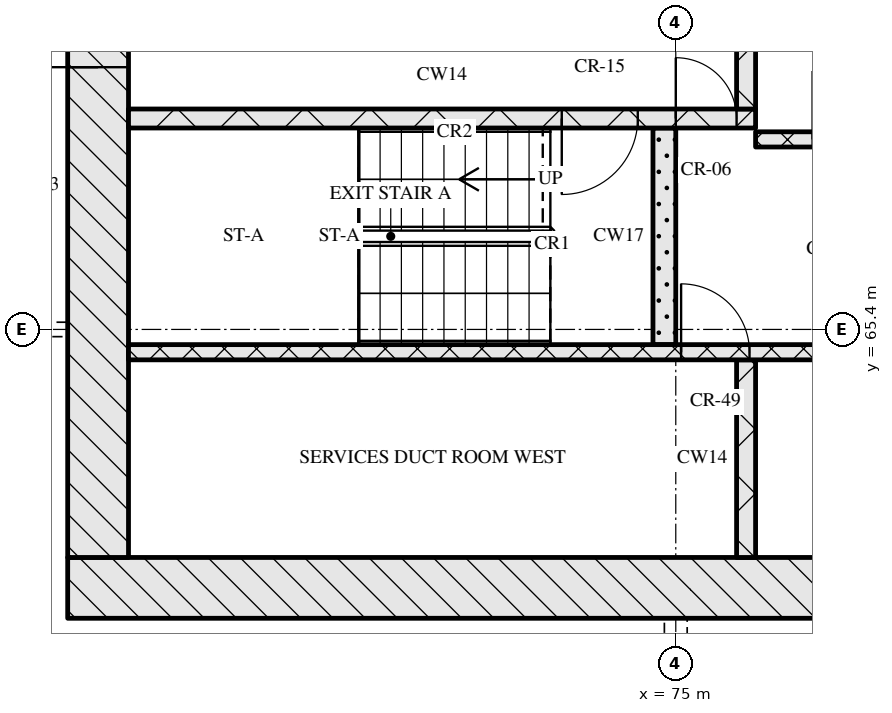
"""IFC4 building model, lengths in metres.
Left out: names, types, materials, properties, quantities, classifications, styles, units other than length and angle.
Written with IfcOpenShell. Run it as: python <this file> out.ifc"""

import sys

from ifc_helpers import new_model, si_unit, direction, frame, frame_2d, origin, place, context, subcontext, project, spatial, rectangle, extrude, element, fill, save


model = new_model("IFC4")
c1 = context("Model", 3, precision=1e-05, world=origin(), true_north=direction((0.0, 1.0)))
c2 = subcontext(c1, "Body", "Model", "MODEL_VIEW")
j1 = project(units=[si_unit("LENGTHUNIT", "METRE"), si_unit("PLANEANGLEUNIT", "RADIAN")], contexts=[c1])
p1 = place(None, origin())
s1 = spatial("IfcSite", under=j1, at=p1, CompositionType="ELEMENT")
p2 = place(p1, origin())
s2 = spatial("IfcBuilding", under=s1, at=p2, CompositionType="ELEMENT")
p3 = place(p2, frame((0.0, 0.0, 183.45)))
s3 = spatial("IfcBuildingStorey", under=s2, at=p3, CompositionType="ELEMENT", Elevation=183.45)
p4 = place(p3, frame((67.0, 62.0, 0.0), z_axis=(0.0, 0.0, 1.0), x_axis=(1.0, 0.0, 0.0)))
e1 = element("IfcWall", 1, at=p4, inside=s3, PredefinedType="SOLIDWALL", context=c2, shape_type="SweptSolid", body=[
    extrude(rectangle(XDim=41.2, YDim=0.8, at=frame_2d((20.6, 0.0))), origin(), (0.0, 0.0, 1.0), 3.32),
])
p5 = place(p4, frame((20.95, 0.0, 0.0)))
e2 = element("IfcOpeningElement", 2, at=p5, cuts=e1, PredefinedType="OPENING", context=c2, shape_type="SweptSolid", body=[
    extrude(rectangle(XDim=1.8, YDim=2.1, at=frame_2d((0.9, 1.05))), frame((0.0, 0.41, 0.0), z_axis=(0.0, -1.0, 0.0), x_axis=(1.0, 0.0, 0.0)), (0.0, 0.0, 1.0), 0.82),
])
p6 = place(p3, frame((67.4, 62.4, 0.0), z_axis=(0.0, 0.0, 1.0), x_axis=(0.0, 1.0, 0.0)))
e3 = element("IfcWall", 3, at=p6, inside=s3, PredefinedType="SOLIDWALL", context=c2, shape_type="SweptSolid", body=[
    extrude(rectangle(XDim=12.0, YDim=0.8, at=frame_2d((6.0, 0.0))), origin(), (0.0, 0.0, 1.0), 3.32),
])
p7 = place(p6, frame((6.45, 0.0, 0.0)))
e4 = element("IfcOpeningElement", 4, at=p7, cuts=e3, PredefinedType="OPENING", context=c2, shape_type="SweptSolid", body=[
    extrude(rectangle(XDim=1.2, YDim=2.1, at=frame_2d((0.6, 1.05))), frame((0.0, 0.41, 0.0), z_axis=(0.0, -1.0, 0.0), x_axis=(1.0, 0.0, 0.0)), (0.0, 0.0, 1.0), 0.82),
])
p8 = place(p3, frame((75.925, 62.4, 0.0), z_axis=(0.0, 0.0, 1.0), x_axis=(0.0, 1.0, 0.0)))
e5 = element("IfcWall", 5, at=p8, inside=s3, PredefinedType="SOLIDWALL", context=c2, shape_type="SweptSolid", body=[
    extrude(rectangle(XDim=2.6, YDim=0.25, at=frame_2d((1.3, 0.0))), origin(), (0.0, 0.0, 1.0), 3.32),
])
p9 = place(p3, frame((67.8, 65.1, 0.0), z_axis=(0.0, 0.0, 1.0), x_axis=(1.0, 0.0, 0.0)))
e6 = element("IfcWall", 6, at=p9, inside=s3, PredefinedType="SOLIDWALL", context=c2, shape_type="SweptSolid", body=[
    extrude(rectangle(XDim=18.5, YDim=0.2, at=frame_2d((9.25, 0.0))), origin(), (0.0, 0.0, 1.0), 3.32),
])
p10 = place(p9, frame((7.27, 0.0, 0.0)))
e7 = element("IfcOpeningElement", 7, at=p10, cuts=e6, PredefinedType="OPENING", context=c2, shape_type="SweptSolid", body=[
    extrude(rectangle(XDim=0.9, YDim=2.1, at=frame_2d((0.45, 1.05))), frame((0.0, 0.11, 0.0), z_axis=(0.0, -1.0, 0.0), x_axis=(1.0, 0.0, 0.0)), (0.0, 0.0, 1.0), 0.22),
])
p11 = place(p9, frame((9.65, 0.0, 0.0)))
e8 = element("IfcOpeningElement", 8, at=p11, cuts=e6, PredefinedType="OPENING", context=c2, shape_type="SweptSolid", body=[
    extrude(rectangle(XDim=0.9, YDim=2.1, at=frame_2d((0.45, 1.05))), frame((0.0, 0.11, 0.0), z_axis=(0.0, -1.0, 0.0), x_axis=(1.0, 0.0, 0.0)), (0.0, 0.0, 1.0), 0.22),
])
p12 = place(p9, frame((13.36, 0.0, 0.0)))
e9 = element("IfcOpeningElement", 9, at=p12, cuts=e6, PredefinedType="OPENING", context=c2, shape_type="SweptSolid", body=[
    extrude(rectangle(XDim=0.9, YDim=2.1, at=frame_2d((0.45, 1.05))), frame((0.0, 0.11, 0.0), z_axis=(0.0, -1.0, 0.0), x_axis=(1.0, 0.0, 0.0)), (0.0, 0.0, 1.0), 0.22),
])
p13 = place(p9, frame((16.7, 0.0, 0.0)))
e10 = element("IfcOpeningElement", 10, at=p13, cuts=e6, PredefinedType="OPENING", context=c2, shape_type="SweptSolid", body=[
    extrude(rectangle(XDim=0.9, YDim=2.1, at=frame_2d((0.45, 1.05))), frame((0.0, 0.11, 0.0), z_axis=(0.0, -1.0, 0.0), x_axis=(1.0, 0.0, 0.0)), (0.0, 0.0, 1.0), 0.22),
])
p14 = place(p3, frame((74.85, 65.2, 0.0), z_axis=(0.0, 0.0, 1.0), x_axis=(0.0, 1.0, 0.0)))
e11 = element("IfcWall", 11, at=p14, inside=s3, PredefinedType="SOLIDWALL", context=c2, shape_type="SweptSolid", body=[
    extrude(rectangle(XDim=2.85, YDim=0.3, at=frame_2d((1.425, 0.0))), origin(), (0.0, 0.0, 1.0), 3.32),
])
p15 = place(p3, frame((76.05, 67.9, 0.0), z_axis=(0.0, 0.0, 1.0), x_axis=(1.0, 0.0, 0.0)))
e12 = element("IfcWall", 12, at=p15, inside=s3, PredefinedType="SOLIDWALL", context=c2, shape_type="SweptSolid", body=[
    extrude(rectangle(XDim=23.1, YDim=0.2, at=frame_2d((11.55, 0.0))), origin(), (0.0, 0.0, 1.0), 3.32),
])
p16 = place(p15, frame((0.75, 0.0, 0.0)))
e13 = element("IfcOpeningElement", 13, at=p16, cuts=e12, PredefinedType="OPENING", context=c2, shape_type="SweptSolid", body=[
    extrude(rectangle(XDim=0.9, YDim=2.1, at=frame_2d((0.45, 1.05))), frame((0.0, 0.11, 0.0), z_axis=(0.0, -1.0, 0.0), x_axis=(1.0, 0.0, 0.0)), (0.0, 0.0, 1.0), 0.22),
])
p17 = place(p15, frame((3.32, 0.0, 0.0)))
e14 = element("IfcOpeningElement", 14, at=p17, cuts=e12, PredefinedType="OPENING", context=c2, shape_type="SweptSolid", body=[
    extrude(rectangle(XDim=0.9, YDim=2.1, at=frame_2d((0.45, 1.05))), frame((0.0, 0.11, 0.0), z_axis=(0.0, -1.0, 0.0), x_axis=(1.0, 0.0, 0.0)), (0.0, 0.0, 1.0), 0.22),
])
p18 = place(p15, frame((5.77, 0.0, 0.0)))
e15 = element("IfcOpeningElement", 15, at=p18, cuts=e12, PredefinedType="OPENING", context=c2, shape_type="SweptSolid", body=[
    extrude(rectangle(XDim=0.9, YDim=2.1, at=frame_2d((0.45, 1.05))), frame((0.0, 0.11, 0.0), z_axis=(0.0, -1.0, 0.0), x_axis=(1.0, 0.0, 0.0)), (0.0, 0.0, 1.0), 0.22),
])
p19 = place(p15, frame((8.45, 0.0, 0.0)))
e16 = element("IfcOpeningElement", 16, at=p19, cuts=e12, PredefinedType="OPENING", context=c2, shape_type="SweptSolid", body=[
    extrude(rectangle(XDim=0.9, YDim=2.1, at=frame_2d((0.45, 1.05))), frame((0.0, 0.11, 0.0), z_axis=(0.0, -1.0, 0.0), x_axis=(1.0, 0.0, 0.0)), (0.0, 0.0, 1.0), 0.22),
])
p20 = place(p15, frame((10.91, 0.0, 0.0)))
e17 = element("IfcOpeningElement", 17, at=p20, cuts=e12, PredefinedType="OPENING", context=c2, shape_type="SweptSolid", body=[
    extrude(rectangle(XDim=0.9, YDim=2.1, at=frame_2d((0.45, 1.05))), frame((0.0, 0.11, 0.0), z_axis=(0.0, -1.0, 0.0), x_axis=(1.0, 0.0, 0.0)), (0.0, 0.0, 1.0), 0.22),
])
p21 = place(p15, frame((13.55, 0.0, 0.0)))
e18 = element("IfcOpeningElement", 18, at=p21, cuts=e12, PredefinedType="OPENING", context=c2, shape_type="SweptSolid", body=[
    extrude(rectangle(XDim=1.0, YDim=2.1, at=frame_2d((0.5, 1.05))), frame((0.0, 0.11, 0.0), z_axis=(0.0, -1.0, 0.0), x_axis=(1.0, 0.0, 0.0)), (0.0, 0.0, 1.0), 0.22),
])
p22 = place(p15, frame((16.2, 0.0, 0.0)))
e19 = element("IfcOpeningElement", 19, at=p22, cuts=e12, PredefinedType="OPENING", context=c2, shape_type="SweptSolid", body=[
    extrude(rectangle(XDim=1.1, YDim=2.1, at=frame_2d((0.55, 1.05))), frame((0.0, 0.11, 0.0), z_axis=(0.0, -1.0, 0.0), x_axis=(1.0, 0.0, 0.0)), (0.0, 0.0, 1.0), 0.22),
])
p23 = place(p15, frame((18.7, 0.0, 0.0)))
e20 = element("IfcOpeningElement", 20, at=p23, cuts=e12, PredefinedType="OPENING", context=c2, shape_type="SweptSolid", body=[
    extrude(rectangle(XDim=1.1, YDim=2.1, at=frame_2d((0.55, 1.05))), frame((0.0, 0.11, 0.0), z_axis=(0.0, -1.0, 0.0), x_axis=(1.0, 0.0, 0.0)), (0.0, 0.0, 1.0), 0.22),
])
p24 = place(p15, frame((21.2, 0.0, 0.0)))
e21 = element("IfcOpeningElement", 21, at=p24, cuts=e12, PredefinedType="OPENING", context=c2, shape_type="SweptSolid", body=[
    extrude(rectangle(XDim=1.1, YDim=2.1, at=frame_2d((0.55, 1.05))), frame((0.0, 0.11, 0.0), z_axis=(0.0, -1.0, 0.0), x_axis=(1.0, 0.0, 0.0)), (0.0, 0.0, 1.0), 0.22),
])
p25 = place(p3, frame((67.8, 68.175, 0.0), z_axis=(0.0, 0.0, 1.0), x_axis=(1.0, 0.0, 0.0)))
e22 = element("IfcWall", 22, at=p25, inside=s3, PredefinedType="SOLIDWALL", context=c2, shape_type="SweptSolid", body=[
    extrude(rectangle(XDim=8.25, YDim=0.25, at=frame_2d((4.125, 0.0))), origin(), (0.0, 0.0, 1.0), 3.32),
])
p26 = place(p25, frame((5.7, 0.0, 0.0)))
e23 = element("IfcOpeningElement", 23, at=p26, cuts=e22, PredefinedType="OPENING", context=c2, shape_type="SweptSolid", body=[
    extrude(rectangle(XDim=1.0, YDim=2.1, at=frame_2d((0.5, 1.05))), frame((0.0, 0.135, 0.0), z_axis=(0.0, -1.0, 0.0), x_axis=(1.0, 0.0, 0.0)), (0.0, 0.0, 1.0), 0.27),
])
p27 = place(p25, frame((7.2, 0.0, 0.0)))
e24 = element("IfcOpeningElement", 24, at=p27, cuts=e22, PredefinedType="OPENING", context=c2, shape_type="SweptSolid", body=[
    extrude(rectangle(XDim=0.8, YDim=2.1, at=frame_2d((0.4, 1.05))), frame((0.0, 0.135, 0.0), z_axis=(0.0, -1.0, 0.0), x_axis=(1.0, 0.0, 0.0)), (0.0, 0.0, 1.0), 0.27),
])
p28 = place(p3, frame((75.925, 68.3, 0.0), z_axis=(0.0, 0.0, 1.0), x_axis=(0.0, 1.0, 0.0)))
e25 = element("IfcWall", 25, at=p28, inside=s3, PredefinedType="SOLIDWALL", context=c2, shape_type="SweptSolid", body=[
    extrude(rectangle(XDim=2.3, YDim=0.25, at=frame_2d((1.15, 0.0))), origin(), (0.0, 0.0, 1.0), 3.32),
])
p29 = place(p10, origin())
e26 = element("IfcDoor", 26, at=p29, inside=s3, OperationType="SINGLE_SWING_LEFT", PredefinedType="DOOR", context=c2, shape_type="SweptSolid", body=[
    extrude(rectangle(XDim=0.9, YDim=2.1, at=frame_2d((0.45, 1.05))), frame((0.0, 0.025, 0.0), z_axis=(0.0, -1.0, 0.0), x_axis=(1.0, 0.0, 0.0)), (0.0, 0.0, 1.0), 0.05),
])
fill(e7, e26)
p30 = place(p26, origin())
e27 = element("IfcDoor", 27, at=p30, inside=s3, OperationType="SINGLE_SWING_RIGHT", PredefinedType="DOOR", context=c2, shape_type="SweptSolid", body=[
    extrude(rectangle(XDim=1.0, YDim=2.1, at=frame_2d((0.5, 1.05))), frame((0.0, 0.025, 0.0), z_axis=(0.0, -1.0, 0.0), x_axis=(1.0, 0.0, 0.0)), (0.0, 0.0, 1.0), 0.05),
])
fill(e23, e27)
p31 = place(p27, origin())
e28 = element("IfcDoor", 28, at=p31, inside=s3, OperationType="SINGLE_SWING_LEFT", PredefinedType="DOOR", context=c2, shape_type="SweptSolid", body=[
    extrude(rectangle(XDim=0.8, YDim=2.1, at=frame_2d((0.4, 1.05))), frame((0.0, 0.025, 0.0), z_axis=(0.0, -1.0, 0.0), x_axis=(1.0, 0.0, 0.0)), (0.0, 0.0, 1.0), 0.05),
])
fill(e24, e28)
p32 = place(p7, origin())
e29 = element("IfcDoor", 29, at=p32, inside=s3, OperationType="SINGLE_SWING_LEFT", PredefinedType="DOOR", context=c2, shape_type="SweptSolid", body=[
    extrude(rectangle(XDim=1.2, YDim=2.1, at=frame_2d((0.6, 1.05))), frame((0.0, 0.025, 0.0), z_axis=(0.0, -1.0, 0.0), x_axis=(1.0, 0.0, 0.0)), (0.0, 0.0, 1.0), 0.05),
])
fill(e4, e29)
save(model, sys.argv[1])
